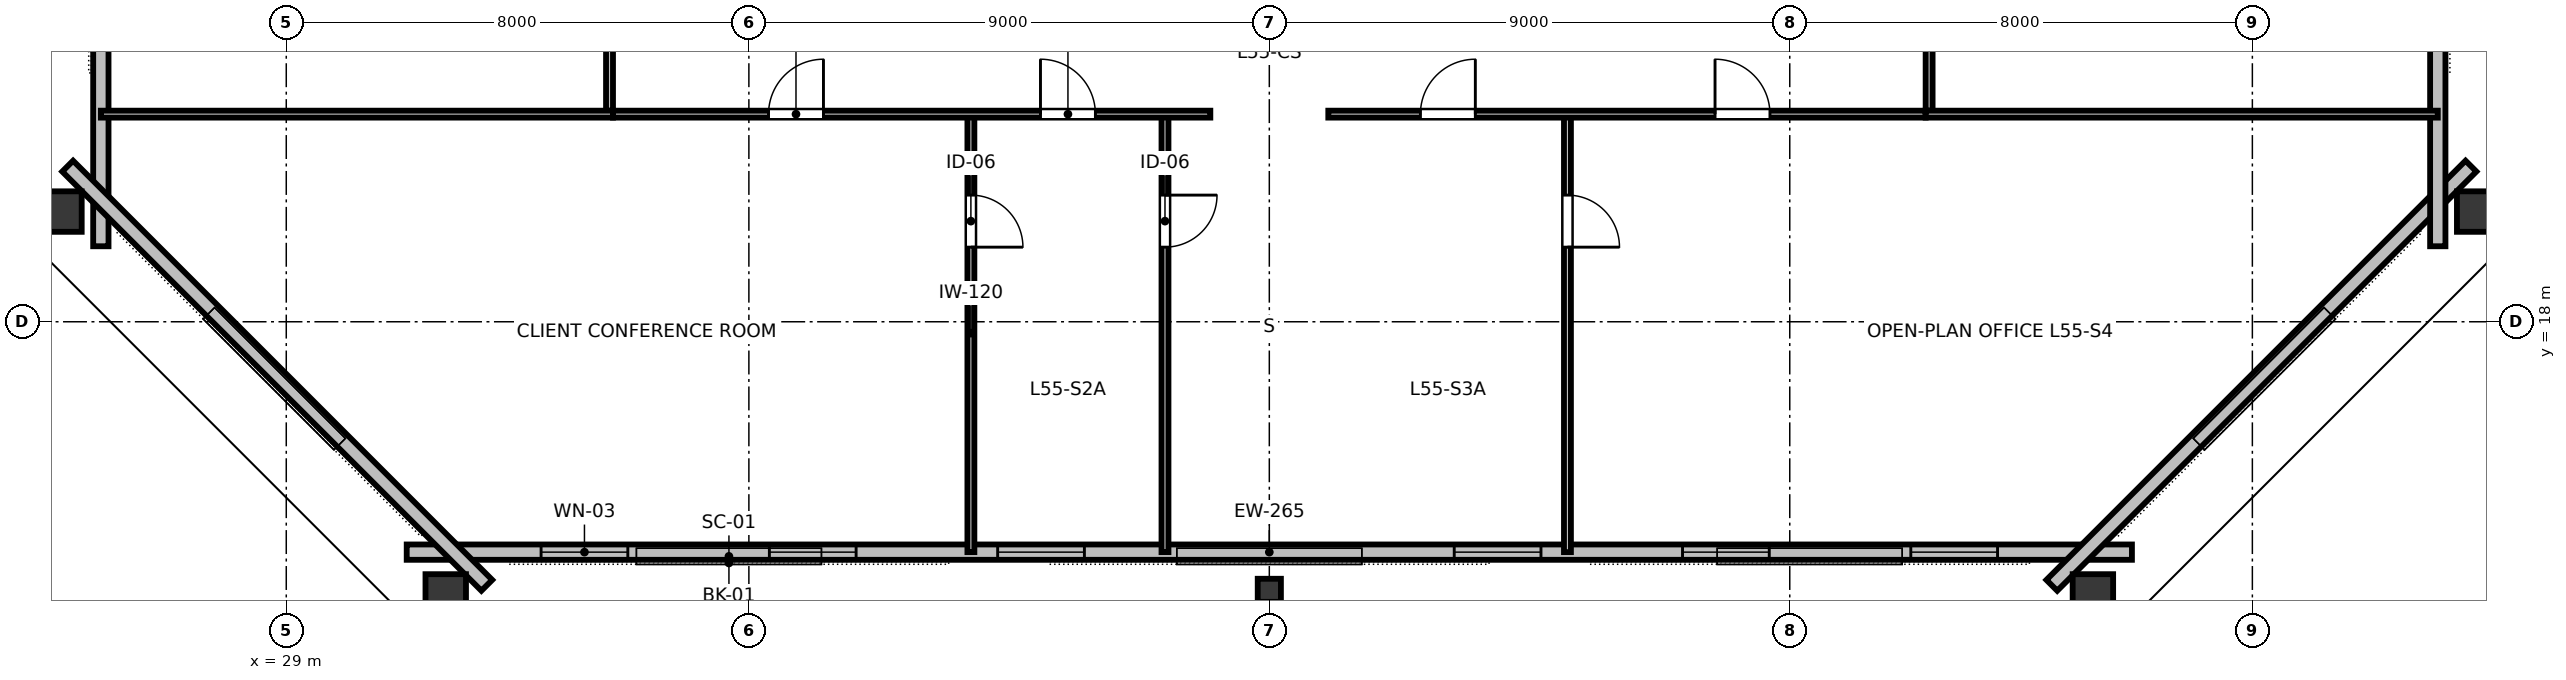
"""IFC4 building model, lengths in metres.
Left out: names, types, materials, properties, quantities, classifications, styles, units other than length and angle.
Written with IfcOpenShell. Run it as: python <this file> out.ifc"""

import sys

from ifc_helpers import new_model, si_unit, direction, frame, frame_2d, origin, origin_2d, place, context, subcontext, project, spatial, rectangle, hollow_rectangle, i_section, extrude, element, fill, save


model = new_model("IFC4")
c1 = context("Model", 3, precision=1e-05, world=origin(), true_north=direction((0.0, 1.0)))
c2 = subcontext(c1, "Body", "Model", "MODEL_VIEW")
j1 = project(units=[si_unit("LENGTHUNIT", "METRE"), si_unit("PLANEANGLEUNIT", "RADIAN")], contexts=[c1])
p1 = place(None, origin())
s1 = spatial("IfcSite", under=j1, at=p1, CompositionType="ELEMENT")
p2 = place(p1, origin())
s2 = spatial("IfcBuilding", under=s1, at=p2, CompositionType="ELEMENT")
p3 = place(p2, frame((0.0, 0.0, 209.4)))
s3 = spatial("IfcBuildingStorey", under=s2, at=p3, CompositionType="ELEMENT", Elevation=209.4)
p4 = place(p3, frame((31.758, 13.21, 0.0), z_axis=(0.0, 0.0, 1.0), x_axis=(1.0, 0.0, 0.0)))
e1 = element("IfcColumn", 1, at=p4, inside=s3, PredefinedType="COLUMN", context=c2, shape_type="SweptSolid", body=[
    extrude(hollow_rectangle(XDim=0.7, YDim=0.85, WallThickness=0.04, at=origin_2d()), origin(), (0.0, 0.0, 1.0), 3.373),
])
p5 = place(p3, frame((46.0, 13.356, 0.0), z_axis=(0.0, 0.0, 1.0), x_axis=(1.0, 0.0, 0.0)))
e2 = element("IfcColumn", 2, at=p5, inside=s3, PredefinedType="COLUMN", context=c2, shape_type="SweptSolid", body=[
    extrude(i_section(OverallWidth=0.401, OverallDepth=0.399, WebThickness=0.025, FlangeThickness=0.04, FilletRadius=0.025, at=origin_2d()), origin(), (0.0, 0.0, 1.0), 3.373),
])
for number, where, z_axis, x_axis in (
    (3, (60.242, 13.21, 0.0), (0.0, 0.0, 1.0), (1.0, 0.0, 0.0)),
    (4, (66.963, 19.905, 0.0), (0.0, 0.0, 1.0), (0.0, 1.0, 0.0)),
    (5, (25.037, 19.905, 0.0), (0.0, 0.0, 1.0), (0.0, 1.0, 0.0)),
):
    element("IfcColumn", number, at=place(p3, frame(where, z_axis=z_axis, x_axis=x_axis)), inside=s3, PredefinedType="COLUMN", context=c2, shape_type="SweptSolid", body=[
        extrude(hollow_rectangle(XDim=0.7, YDim=0.85, WallThickness=0.04, at=origin_2d()), origin(), (0.0, 0.0, 1.0), 3.373),
    ])
p6 = place(p3, frame((31.083, 14.016, 0.0), z_axis=(0.0, 0.0, 1.0), x_axis=(1.0, 0.0, 0.0)))
e6 = element("IfcWall", 6, at=p6, inside=s3, PredefinedType="STANDARD", context=c2, shape_type="SweptSolid", body=[
    extrude(rectangle(XDim=29.834, YDim=0.265, at=frame_2d((14.917, 0.0))), origin(), (0.0, 0.0, 1.0), 3.375),
])
p7 = place(p6, frame((2.324, 0.0, 0.85)))
e7 = element("IfcOpeningElement", 7, at=p7, cuts=e6, PredefinedType="OPENING", context=c2, shape_type="SweptSolid", body=[
    extrude(rectangle(XDim=1.5, YDim=1.85, at=frame_2d((0.75, 0.925))), frame((0.0, 0.142, 0.0), z_axis=(0.0, -1.0, 0.0), x_axis=(1.0, 0.0, 0.0)), (0.0, 0.0, 1.0), 0.285),
])
p8 = place(p6, frame((6.272, 0.0, 0.85)))
e8 = element("IfcOpeningElement", 8, at=p8, cuts=e6, PredefinedType="OPENING", context=c2, shape_type="SweptSolid", body=[
    extrude(rectangle(XDim=1.5, YDim=1.85, at=frame_2d((0.75, 0.925))), frame((0.0, 0.142, 0.0), z_axis=(0.0, -1.0, 0.0), x_axis=(1.0, 0.0, 0.0)), (0.0, 0.0, 1.0), 0.285),
])
p9 = place(p6, frame((10.219, 0.0, 0.85)))
e9 = element("IfcOpeningElement", 9, at=p9, cuts=e6, PredefinedType="OPENING", context=c2, shape_type="SweptSolid", body=[
    extrude(rectangle(XDim=1.5, YDim=1.85, at=frame_2d((0.75, 0.925))), frame((0.0, 0.142, 0.0), z_axis=(0.0, -1.0, 0.0), x_axis=(1.0, 0.0, 0.0)), (0.0, 0.0, 1.0), 0.285),
])
p10 = place(p6, frame((18.115, 0.0, 0.85)))
e10 = element("IfcOpeningElement", 10, at=p10, cuts=e6, PredefinedType="OPENING", context=c2, shape_type="SweptSolid", body=[
    extrude(rectangle(XDim=1.5, YDim=1.85, at=frame_2d((0.75, 0.925))), frame((0.0, 0.142, 0.0), z_axis=(0.0, -1.0, 0.0), x_axis=(1.0, 0.0, 0.0)), (0.0, 0.0, 1.0), 0.285),
])
p11 = place(p6, frame((22.063, 0.0, 0.85)))
e11 = element("IfcOpeningElement", 11, at=p11, cuts=e6, PredefinedType="OPENING", context=c2, shape_type="SweptSolid", body=[
    extrude(rectangle(XDim=1.5, YDim=1.85, at=frame_2d((0.75, 0.925))), frame((0.0, 0.142, 0.0), z_axis=(0.0, -1.0, 0.0), x_axis=(1.0, 0.0, 0.0)), (0.0, 0.0, 1.0), 0.285),
])
p12 = place(p6, frame((26.011, 0.0, 0.85)))
e12 = element("IfcOpeningElement", 12, at=p12, cuts=e6, PredefinedType="OPENING", context=c2, shape_type="SweptSolid", body=[
    extrude(rectangle(XDim=1.5, YDim=1.85, at=frame_2d((0.75, 0.925))), frame((0.0, 0.142, 0.0), z_axis=(0.0, -1.0, 0.0), x_axis=(1.0, 0.0, 0.0)), (0.0, 0.0, 1.0), 0.285),
])
p13 = place(p3, frame((59.532, 13.442, 0.0), z_axis=(0.0, 0.0, 1.0), x_axis=(0.707106781187, 0.707106781187, 0.0)))
e13 = element("IfcWall", 13, at=p13, inside=s3, PredefinedType="STANDARD", context=c2, shape_type="SweptSolid", body=[
    extrude(rectangle(XDim=10.251, YDim=0.265, at=frame_2d((5.125, 0.0))), origin(), (0.0, 0.0, 1.0), 3.375),
])
p14 = place(p3, frame((66.206, 19.305, 0.0), z_axis=(0.0, 0.0, 1.0), x_axis=(0.0, 1.0, 0.0)))
e14 = element("IfcWall", 14, at=p14, inside=s3, PredefinedType="STANDARD", context=c2, shape_type="SweptSolid", body=[
    extrude(rectangle(XDim=25.389, YDim=0.265, at=frame_2d((12.695, 0.0))), origin(), (0.0, 0.0, 1.0), 3.375),
])
p15 = place(p14, frame((6.147, 0.0, 0.85)))
e15 = element("IfcOpeningElement", 15, at=p15, cuts=e14, PredefinedType="OPENING", context=c2, shape_type="SweptSolid", body=[
    extrude(rectangle(XDim=1.5, YDim=1.85, at=frame_2d((0.75, 0.925))), frame((0.0, 0.142, 0.0), z_axis=(0.0, -1.0, 0.0), x_axis=(1.0, 0.0, 0.0)), (0.0, 0.0, 1.0), 0.285),
])
p16 = place(p14, frame((17.742, 0.0, 0.85)))
e16 = element("IfcOpeningElement", 16, at=p16, cuts=e14, PredefinedType="OPENING", context=c2, shape_type="SweptSolid", body=[
    extrude(rectangle(XDim=1.5, YDim=1.85, at=frame_2d((0.75, 0.925))), frame((0.0, 0.142, 0.0), z_axis=(0.0, -1.0, 0.0), x_axis=(1.0, 0.0, 0.0)), (0.0, 0.0, 1.0), 0.285),
])
p17 = place(p3, frame((25.794, 44.695, 0.0), z_axis=(0.0, 0.0, 1.0), x_axis=(0.0, -1.0, 0.0)))
e17 = element("IfcWall", 17, at=p17, inside=s3, PredefinedType="STANDARD", context=c2, shape_type="SweptSolid", body=[
    extrude(rectangle(XDim=25.389, YDim=0.265, at=frame_2d((12.695, 0.0))), origin(), (0.0, 0.0, 1.0), 3.375),
])
p18 = place(p17, frame((6.147, 0.0, 0.85)))
e18 = element("IfcOpeningElement", 18, at=p18, cuts=e17, PredefinedType="OPENING", context=c2, shape_type="SweptSolid", body=[
    extrude(rectangle(XDim=1.5, YDim=1.85, at=frame_2d((0.75, 0.925))), frame((0.0, 0.142, 0.0), z_axis=(0.0, -1.0, 0.0), x_axis=(1.0, 0.0, 0.0)), (0.0, 0.0, 1.0), 0.285),
])
p19 = place(p17, frame((10.012, 0.0, 0.85)))
e19 = element("IfcOpeningElement", 19, at=p19, cuts=e17, PredefinedType="OPENING", context=c2, shape_type="SweptSolid", body=[
    extrude(rectangle(XDim=1.5, YDim=1.85, at=frame_2d((0.75, 0.925))), frame((0.0, 0.142, 0.0), z_axis=(0.0, -1.0, 0.0), x_axis=(1.0, 0.0, 0.0)), (0.0, 0.0, 1.0), 0.285),
])
p20 = place(p17, frame((13.877, 0.0, 0.85)))
e20 = element("IfcOpeningElement", 20, at=p20, cuts=e17, PredefinedType="OPENING", context=c2, shape_type="SweptSolid", body=[
    extrude(rectangle(XDim=1.5, YDim=1.85, at=frame_2d((0.75, 0.925))), frame((0.0, 0.142, 0.0), z_axis=(0.0, -1.0, 0.0), x_axis=(1.0, 0.0, 0.0)), (0.0, 0.0, 1.0), 0.285),
])
p21 = place(p17, frame((17.742, 0.0, 0.85)))
e21 = element("IfcOpeningElement", 21, at=p21, cuts=e17, PredefinedType="OPENING", context=c2, shape_type="SweptSolid", body=[
    extrude(rectangle(XDim=1.5, YDim=1.85, at=frame_2d((0.75, 0.925))), frame((0.0, 0.142, 0.0), z_axis=(0.0, -1.0, 0.0), x_axis=(1.0, 0.0, 0.0)), (0.0, 0.0, 1.0), 0.285),
])
p22 = place(p3, frame((25.22, 20.691, 0.0), z_axis=(0.0, 0.0, 1.0), x_axis=(0.707106781187, -0.707106781187, 0.0)))
e22 = element("IfcWall", 22, at=p22, inside=s3, PredefinedType="STANDARD", context=c2, shape_type="SweptSolid", body=[
    extrude(rectangle(XDim=10.251, YDim=0.265, at=frame_2d((5.125, 0.0))), origin(), (0.0, 0.0, 1.0), 3.375),
])
p23 = place(p3, frame((40.839, 21.59, 0.0), z_axis=(0.0, 0.0, 1.0), x_axis=(0.0, -1.0, 0.0)))
e23 = element("IfcWall", 23, at=p23, inside=s3, PredefinedType="PARTITIONING", context=c2, shape_type="SweptSolid", body=[
    extrude(rectangle(XDim=7.574, YDim=0.12, at=frame_2d((3.787, 0.0))), origin(), (0.0, 0.0, 1.0), 2.655),
])
p24 = place(p23, frame((1.4, 0.0, 0.0)))
e24 = element("IfcOpeningElement", 24, at=p24, cuts=e23, PredefinedType="OPENING", context=c2, shape_type="SweptSolid", body=[
    extrude(rectangle(XDim=0.9, YDim=2.15, at=frame_2d((0.45, 1.075))), frame((0.0, 0.07, 0.0), z_axis=(0.0, -1.0, 0.0), x_axis=(1.0, 0.0, 0.0)), (0.0, 0.0, 1.0), 0.14),
])
p25 = place(p3, frame((44.196, 21.59, 0.0), z_axis=(0.0, 0.0, 1.0), x_axis=(0.0, -1.0, 0.0)))
e25 = element("IfcWall", 25, at=p25, inside=s3, PredefinedType="PARTITIONING", context=c2, shape_type="SweptSolid", body=[
    extrude(rectangle(XDim=7.574, YDim=0.12, at=frame_2d((3.787, 0.0))), origin(), (0.0, 0.0, 1.0), 2.655),
])
p26 = place(p25, frame((1.4, 0.0, 0.0)))
e26 = element("IfcOpeningElement", 26, at=p26, cuts=e25, PredefinedType="OPENING", context=c2, shape_type="SweptSolid", body=[
    extrude(rectangle(XDim=0.9, YDim=2.15, at=frame_2d((0.45, 1.075))), frame((0.0, 0.07, 0.0), z_axis=(0.0, -1.0, 0.0), x_axis=(1.0, 0.0, 0.0)), (0.0, 0.0, 1.0), 0.14),
])
p27 = place(p3, frame((51.156, 21.59, 0.0), z_axis=(0.0, 0.0, 1.0), x_axis=(0.0, -1.0, 0.0)))
e27 = element("IfcWall", 27, at=p27, inside=s3, PredefinedType="PARTITIONING", context=c2, shape_type="SweptSolid", body=[
    extrude(rectangle(XDim=7.574, YDim=0.12, at=frame_2d((3.787, 0.0))), origin(), (0.0, 0.0, 1.0), 2.655),
])
p28 = place(p27, frame((1.4, 0.0, 0.0)))
e28 = element("IfcOpeningElement", 28, at=p28, cuts=e27, PredefinedType="OPENING", context=c2, shape_type="SweptSolid", body=[
    extrude(rectangle(XDim=0.9, YDim=2.15, at=frame_2d((0.45, 1.075))), frame((0.0, 0.07, 0.0), z_axis=(0.0, -1.0, 0.0), x_axis=(1.0, 0.0, 0.0)), (0.0, 0.0, 1.0), 0.14),
])
p29 = place(p3, frame((34.65, 21.59, 0.0), z_axis=(0.0, 0.0, 1.0), x_axis=(1.0, 0.0, 0.0)))
e29 = element("IfcWall", 29, at=p29, inside=s3, PredefinedType="PARTITIONING", context=c2, shape_type="SweptSolid", body=[
    extrude(rectangle(XDim=10.33, YDim=0.12, at=frame_2d((5.165, 0.0))), origin(), (0.0, 0.0, 1.0), 2.655),
])
p30 = place(p29, frame((2.69, 0.0, 0.0)))
e30 = element("IfcOpeningElement", 30, at=p30, cuts=e29, PredefinedType="OPENING", context=c2, shape_type="SweptSolid", body=[
    extrude(rectangle(XDim=0.95, YDim=2.15, at=frame_2d((0.475, 1.075))), frame((0.0, 0.07, 0.0), z_axis=(0.0, -1.0, 0.0), x_axis=(1.0, 0.0, 0.0)), (0.0, 0.0, 1.0), 0.14),
])
p31 = place(p29, frame((7.393, 0.0, 0.0)))
e31 = element("IfcOpeningElement", 31, at=p31, cuts=e29, PredefinedType="OPENING", context=c2, shape_type="SweptSolid", body=[
    extrude(rectangle(XDim=0.95, YDim=2.15, at=frame_2d((0.475, 1.075))), frame((0.0, 0.07, 0.0), z_axis=(0.0, -1.0, 0.0), x_axis=(1.0, 0.0, 0.0)), (0.0, 0.0, 1.0), 0.14),
])
p32 = place(p3, frame((47.02, 21.59, 0.0), z_axis=(0.0, 0.0, 1.0), x_axis=(1.0, 0.0, 0.0)))
e32 = element("IfcWall", 32, at=p32, inside=s3, PredefinedType="PARTITIONING", context=c2, shape_type="SweptSolid", body=[
    extrude(rectangle(XDim=10.33, YDim=0.12, at=frame_2d((5.165, 0.0))), origin(), (0.0, 0.0, 1.0), 2.655),
])
p33 = place(p32, frame((1.593, 0.0, 0.0)))
e33 = element("IfcOpeningElement", 33, at=p33, cuts=e32, PredefinedType="OPENING", context=c2, shape_type="SweptSolid", body=[
    extrude(rectangle(XDim=0.95, YDim=2.15, at=frame_2d((0.475, 1.075))), frame((0.0, 0.07, 0.0), z_axis=(0.0, -1.0, 0.0), x_axis=(1.0, 0.0, 0.0)), (0.0, 0.0, 1.0), 0.14),
])
p34 = place(p32, frame((6.688, 0.0, 0.0)))
e34 = element("IfcOpeningElement", 34, at=p34, cuts=e32, PredefinedType="OPENING", context=c2, shape_type="SweptSolid", body=[
    extrude(rectangle(XDim=0.95, YDim=2.15, at=frame_2d((0.475, 1.075))), frame((0.0, 0.07, 0.0), z_axis=(0.0, -1.0, 0.0), x_axis=(1.0, 0.0, 0.0)), (0.0, 0.0, 1.0), 0.14),
])
p35 = place(p3, frame((34.59, 21.65, 0.0), z_axis=(0.0, 0.0, 1.0), x_axis=(0.0, 1.0, 0.0)))
e35 = element("IfcWall", 35, at=p35, inside=s3, PredefinedType="PARTITIONING", context=c2, shape_type="SweptSolid", body=[
    extrude(rectangle(XDim=20.7, YDim=0.12, at=frame_2d((10.35, 0.0))), origin(), (0.0, 0.0, 1.0), 2.655),
])
p36 = place(p35, frame((9.875, 0.0, 0.0)))
e36 = element("IfcOpeningElement", 36, at=p36, cuts=e35, PredefinedType="OPENING", context=c2, shape_type="SweptSolid", body=[
    extrude(rectangle(XDim=0.95, YDim=2.15, at=frame_2d((0.475, 1.075))), frame((0.0, 0.07, 0.0), z_axis=(0.0, -1.0, 0.0), x_axis=(1.0, 0.0, 0.0)), (0.0, 0.0, 1.0), 0.14),
])
p37 = place(p3, frame((57.41, 21.65, 0.0), z_axis=(0.0, 0.0, 1.0), x_axis=(0.0, 1.0, 0.0)))
e37 = element("IfcWall", 37, at=p37, inside=s3, PredefinedType="PARTITIONING", context=c2, shape_type="SweptSolid", body=[
    extrude(rectangle(XDim=20.7, YDim=0.12, at=frame_2d((10.35, 0.0))), origin(), (0.0, 0.0, 1.0), 2.655),
])
p38 = place(p37, frame((3.546, 0.0, 0.0)))
e38 = element("IfcOpeningElement", 38, at=p38, cuts=e37, PredefinedType="OPENING", context=c2, shape_type="SweptSolid", body=[
    extrude(rectangle(XDim=0.95, YDim=2.15, at=frame_2d((0.475, 1.075))), frame((0.0, 0.07, 0.0), z_axis=(0.0, -1.0, 0.0), x_axis=(1.0, 0.0, 0.0)), (0.0, 0.0, 1.0), 0.14),
])
p39 = place(p37, frame((10.054, 0.0, 0.0)))
e39 = element("IfcOpeningElement", 39, at=p39, cuts=e37, PredefinedType="OPENING", context=c2, shape_type="SweptSolid", body=[
    extrude(rectangle(XDim=0.95, YDim=2.15, at=frame_2d((0.475, 1.075))), frame((0.0, 0.07, 0.0), z_axis=(0.0, -1.0, 0.0), x_axis=(1.0, 0.0, 0.0)), (0.0, 0.0, 1.0), 0.14),
])
p40 = place(p37, frame((16.384, 0.0, 0.0)))
e40 = element("IfcOpeningElement", 40, at=p40, cuts=e37, PredefinedType="OPENING", context=c2, shape_type="SweptSolid", body=[
    extrude(rectangle(XDim=0.95, YDim=2.15, at=frame_2d((0.475, 1.075))), frame((0.0, 0.07, 0.0), z_axis=(0.0, -1.0, 0.0), x_axis=(1.0, 0.0, 0.0)), (0.0, 0.0, 1.0), 0.14),
])
for number, where, z_axis, x_axis in (
    (41, (34.65, 21.59, 0.0), (0.0, 0.0, 1.0), (-1.0, 0.0, 0.0)),
    (42, (57.35, 21.59, 0.0), (0.0, 0.0, 1.0), (1.0, 0.0, 0.0)),
):
    element("IfcWall", number, at=place(p3, frame(where, z_axis=z_axis, x_axis=x_axis)), inside=s3, PredefinedType="PARTITIONING", context=c2, shape_type="SweptSolid", body=[
        extrude(rectangle(XDim=8.856, YDim=0.12, at=frame_2d((4.428, 0.0))), origin(), (0.0, 0.0, 1.0), 2.655),
    ])
p41 = place(p7, origin())
e43 = element("IfcWindow", 43, at=p41, inside=s3, PartitioningType="SINGLE_PANEL", PredefinedType="WINDOW", context=c2, shape_type="SweptSolid", body=[
    extrude(rectangle(XDim=1.5, YDim=1.85, at=frame_2d((0.75, 0.925))), frame((0.0, 0.03, 0.0), z_axis=(0.0, -1.0, 0.0), x_axis=(1.0, 0.0, 0.0)), (0.0, 0.0, 1.0), 0.06),
])
fill(e7, e43)
p42 = place(p8, origin())
e44 = element("IfcWindow", 44, at=p42, inside=s3, PartitioningType="SINGLE_PANEL", PredefinedType="WINDOW", context=c2, shape_type="SweptSolid", body=[
    extrude(rectangle(XDim=1.5, YDim=1.85, at=frame_2d((0.75, 0.925))), frame((0.0, 0.03, 0.0), z_axis=(0.0, -1.0, 0.0), x_axis=(1.0, 0.0, 0.0)), (0.0, 0.0, 1.0), 0.06),
])
fill(e8, e44)
p43 = place(p9, origin())
e45 = element("IfcWindow", 45, at=p43, inside=s3, PartitioningType="SINGLE_PANEL", PredefinedType="WINDOW", context=c2, shape_type="SweptSolid", body=[
    extrude(rectangle(XDim=1.5, YDim=1.85, at=frame_2d((0.75, 0.925))), frame((0.0, 0.03, 0.0), z_axis=(0.0, -1.0, 0.0), x_axis=(1.0, 0.0, 0.0)), (0.0, 0.0, 1.0), 0.06),
])
fill(e9, e45)
p44 = place(p10, origin())
e46 = element("IfcWindow", 46, at=p44, inside=s3, PartitioningType="SINGLE_PANEL", PredefinedType="WINDOW", context=c2, shape_type="SweptSolid", body=[
    extrude(rectangle(XDim=1.5, YDim=1.85, at=frame_2d((0.75, 0.925))), frame((0.0, 0.03, 0.0), z_axis=(0.0, -1.0, 0.0), x_axis=(1.0, 0.0, 0.0)), (0.0, 0.0, 1.0), 0.06),
])
fill(e10, e46)
p45 = place(p11, origin())
e47 = element("IfcWindow", 47, at=p45, inside=s3, PartitioningType="SINGLE_PANEL", PredefinedType="WINDOW", context=c2, shape_type="SweptSolid", body=[
    extrude(rectangle(XDim=1.5, YDim=1.85, at=frame_2d((0.75, 0.925))), frame((0.0, 0.03, 0.0), z_axis=(0.0, -1.0, 0.0), x_axis=(1.0, 0.0, 0.0)), (0.0, 0.0, 1.0), 0.06),
])
fill(e11, e47)
p46 = place(p12, origin())
e48 = element("IfcWindow", 48, at=p46, inside=s3, PartitioningType="SINGLE_PANEL", PredefinedType="WINDOW", context=c2, shape_type="SweptSolid", body=[
    extrude(rectangle(XDim=1.5, YDim=1.85, at=frame_2d((0.75, 0.925))), frame((0.0, 0.03, 0.0), z_axis=(0.0, -1.0, 0.0), x_axis=(1.0, 0.0, 0.0)), (0.0, 0.0, 1.0), 0.06),
])
fill(e12, e48)
p47 = place(p24, origin())
e49 = element("IfcDoor", 49, at=p47, inside=s3, OperationType="SINGLE_SWING_RIGHT", PredefinedType="DOOR", context=c2, shape_type="SweptSolid", body=[
    extrude(rectangle(XDim=0.9, YDim=2.15, at=frame_2d((0.45, 1.075))), frame((0.0, 0.025, 0.0), z_axis=(0.0, -1.0, 0.0), x_axis=(1.0, 0.0, 0.0)), (0.0, 0.0, 1.0), 0.05),
])
fill(e24, e49)
p48 = place(p26, origin())
e50 = element("IfcDoor", 50, at=p48, inside=s3, OperationType="SINGLE_SWING_LEFT", PredefinedType="DOOR", context=c2, shape_type="SweptSolid", body=[
    extrude(rectangle(XDim=0.9, YDim=2.15, at=frame_2d((0.45, 1.075))), frame((0.0, 0.025, 0.0), z_axis=(0.0, -1.0, 0.0), x_axis=(1.0, 0.0, 0.0)), (0.0, 0.0, 1.0), 0.05),
])
fill(e26, e50)
p49 = place(p28, origin())
e51 = element("IfcDoor", 51, at=p49, inside=s3, OperationType="SINGLE_SWING_RIGHT", PredefinedType="DOOR", context=c2, shape_type="SweptSolid", body=[
    extrude(rectangle(XDim=0.9, YDim=2.15, at=frame_2d((0.45, 1.075))), frame((0.0, 0.025, 0.0), z_axis=(0.0, -1.0, 0.0), x_axis=(1.0, 0.0, 0.0)), (0.0, 0.0, 1.0), 0.05),
])
fill(e28, e51)
p50 = place(p30, origin())
e52 = element("IfcDoor", 52, at=p50, inside=s3, OperationType="SINGLE_SWING_RIGHT", PredefinedType="DOOR", context=c2, shape_type="SweptSolid", body=[
    extrude(rectangle(XDim=0.95, YDim=2.15, at=frame_2d((0.475, 1.075))), frame((0.0, 0.025, 0.0), z_axis=(0.0, -1.0, 0.0), x_axis=(1.0, 0.0, 0.0)), (0.0, 0.0, 1.0), 0.05),
])
fill(e30, e52)
p51 = place(p31, origin())
e53 = element("IfcDoor", 53, at=p51, inside=s3, OperationType="SINGLE_SWING_LEFT", PredefinedType="DOOR", context=c2, shape_type="SweptSolid", body=[
    extrude(rectangle(XDim=0.95, YDim=2.15, at=frame_2d((0.475, 1.075))), frame((0.0, 0.025, 0.0), z_axis=(0.0, -1.0, 0.0), x_axis=(1.0, 0.0, 0.0)), (0.0, 0.0, 1.0), 0.05),
])
fill(e31, e53)
p52 = place(p33, origin())
e54 = element("IfcDoor", 54, at=p52, inside=s3, OperationType="SINGLE_SWING_RIGHT", PredefinedType="DOOR", context=c2, shape_type="SweptSolid", body=[
    extrude(rectangle(XDim=0.95, YDim=2.15, at=frame_2d((0.475, 1.075))), frame((0.0, 0.025, 0.0), z_axis=(0.0, -1.0, 0.0), x_axis=(1.0, 0.0, 0.0)), (0.0, 0.0, 1.0), 0.05),
])
fill(e33, e54)
p53 = place(p34, origin())
e55 = element("IfcDoor", 55, at=p53, inside=s3, OperationType="SINGLE_SWING_LEFT", PredefinedType="DOOR", context=c2, shape_type="SweptSolid", body=[
    extrude(rectangle(XDim=0.95, YDim=2.15, at=frame_2d((0.475, 1.075))), frame((0.0, 0.025, 0.0), z_axis=(0.0, -1.0, 0.0), x_axis=(1.0, 0.0, 0.0)), (0.0, 0.0, 1.0), 0.05),
])
fill(e34, e55)
save(model, sys.argv[1])
